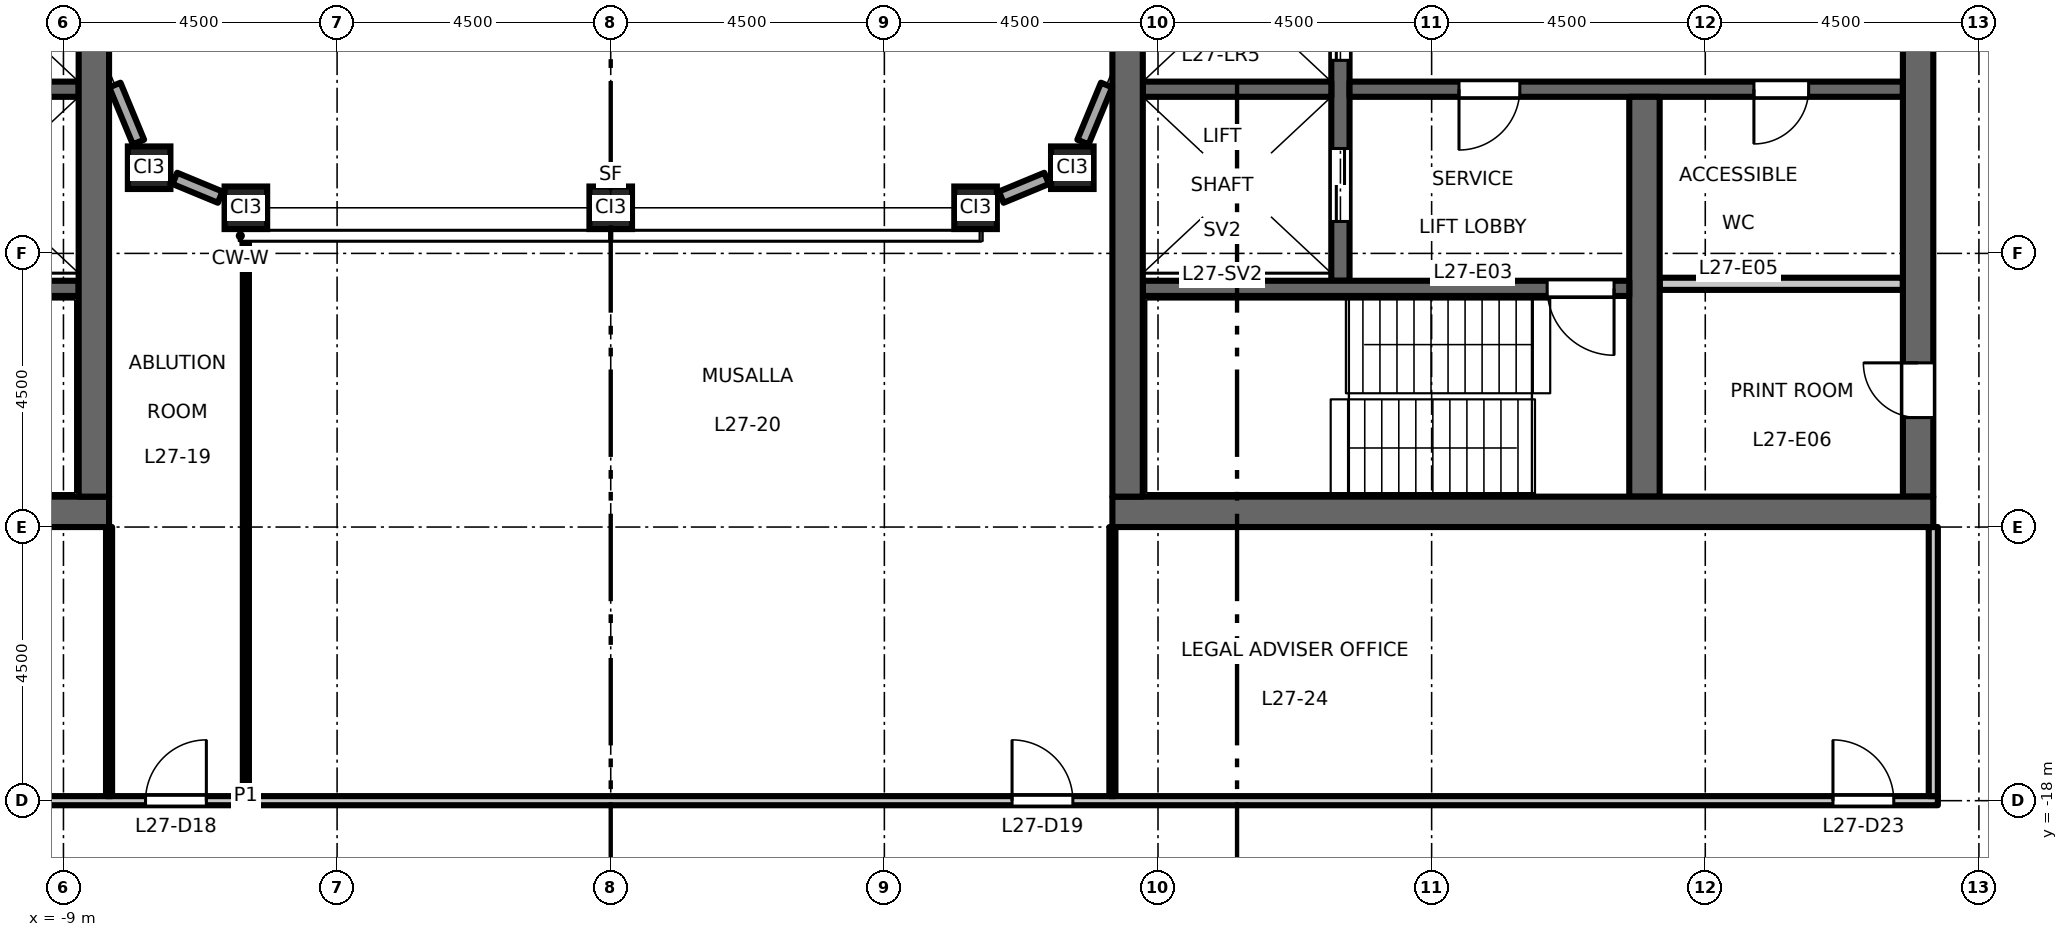
"""IFC4 building model, lengths in metres.
Left out: names, types, materials, properties, quantities, classifications, styles, units other than length and angle.
Written with IfcOpenShell. Run it as: python <this file> out.ifc"""

import sys

from ifc_helpers import new_model, si_unit, direction, frame, frame_2d, origin, origin_2d, place, context, subcontext, project, spatial, rectangle, hollow_rectangle, extrude, element, fill, save


model = new_model("IFC4")
c1 = context("Model", 3, precision=1e-05, world=origin(), true_north=direction((0.0, 1.0)))
c2 = subcontext(c1, "Body", "Model", "MODEL_VIEW")
j1 = project(units=[si_unit("LENGTHUNIT", "METRE"), si_unit("PLANEANGLEUNIT", "RADIAN")], contexts=[c1])
p1 = place(None, origin())
s1 = spatial("IfcSite", under=j1, at=p1, CompositionType="ELEMENT")
p2 = place(p1, origin())
s2 = spatial("IfcBuilding", under=s1, at=p2, CompositionType="ELEMENT")
p3 = place(p2, frame((0.0, 0.0, 127.2)))
s3 = spatial("IfcBuildingStorey", under=s2, at=p3, CompositionType="ELEMENT", Elevation=127.2)
for number, where, z_axis, x_axis in (
    (1, (-7.591, -7.591, 0.0), (0.0, 0.0, 1.0), (1.0, 0.0, 0.0)),
    (2, (-6.0, -8.25, 0.0), (0.0, 0.0, 1.0), (1.0, 0.0, 0.0)),
    (3, (0.0, -8.25, 0.0), (0.0, 0.0, 1.0), (1.0, 0.0, 0.0)),
    (4, (6.0, -8.25, 0.0), (0.0, 0.0, 1.0), (1.0, 0.0, 0.0)),
    (5, (7.591, -7.591, 0.0), (0.0, 0.0, 1.0), (1.0, 0.0, 0.0)),
):
    element("IfcColumn", number, at=place(p3, frame(where, z_axis=z_axis, x_axis=x_axis)), inside=s3, PredefinedType="COLUMN", context=c2, shape_type="SweptSolid", body=[
        extrude(hollow_rectangle(XDim=0.7, YDim=0.7, WallThickness=0.04, at=origin_2d()), origin(), (0.0, 0.0, 1.0), 4.5),
    ])
p4 = place(p3, frame((-8.75, -6.3, 0.0), z_axis=(0.0, 0.0, 1.0), x_axis=(-1.0, 0.0, 0.0)))
e6 = element("IfcWall", 6, at=p4, inside=s3, PredefinedType="SHEAR", context=c2, shape_type="SweptSolid", body=[
    extrude(rectangle(XDim=3.1, YDim=0.25, at=frame_2d((1.55, 0.0))), origin(), (0.0, 0.0, 1.0), 4.35),
])
p5 = place(p3, frame((-8.75, -9.575, 0.0), z_axis=(0.0, 0.0, 1.0), x_axis=(-1.0, 0.0, 0.0)))
e7 = element("IfcWall", 7, at=p5, inside=s3, PredefinedType="SHEAR", context=c2, shape_type="SweptSolid", body=[
    extrude(rectangle(XDim=8.0, YDim=0.25, at=frame_2d((4.0, 0.0))), origin(), (0.0, 0.0, 1.0), 4.35),
])
p6 = place(p5, frame((6.65, 0.0, 0.0)))
e8 = element("IfcOpeningElement", 8, at=p6, cuts=e7, PredefinedType="OPENING", context=c2, shape_type="SweptSolid", body=[
    extrude(rectangle(XDim=1.1, YDim=2.1, at=frame_2d((0.55, 1.05))), frame((0.0, 0.135, 0.0), z_axis=(0.0, -1.0, 0.0), x_axis=(1.0, 0.0, 0.0)), (0.0, 0.0, 1.0), 0.27),
])
p7 = place(p3, frame((-8.25, -13.25, 0.0), z_axis=(0.0, 0.0, 1.0), x_axis=(-1.0, 0.0, 0.0)))
e9 = element("IfcWall", 9, at=p7, inside=s3, PredefinedType="SHEAR", context=c2, shape_type="SweptSolid", body=[
    extrude(rectangle(XDim=13.5, YDim=0.5, at=frame_2d((6.75, 0.0))), origin(), (0.0, 0.0, 1.0), 4.35),
])
p8 = place(p3, frame((-8.5, -13.0, 0.0), z_axis=(0.0, 0.0, 1.0), x_axis=(0.0, 1.0, 0.0)))
e10 = element("IfcWall", 10, at=p8, inside=s3, PredefinedType="SHEAR", context=c2, shape_type="SweptSolid", body=[
    extrude(rectangle(XDim=26.0, YDim=0.5, at=frame_2d((13.0, 0.0))), origin(), (0.0, 0.0, 1.0), 4.35),
])
p9 = place(p3, frame((12.0, -9.45, 0.0), z_axis=(0.0, 0.0, 1.0), x_axis=(0.0, 1.0, 0.0)))
e11 = element("IfcWall", 11, at=p9, inside=s3, PredefinedType="SHEAR", context=c2, shape_type="SweptSolid", body=[
    extrude(rectangle(XDim=18.9, YDim=0.3, at=frame_2d((9.45, 0.0))), origin(), (0.0, 0.0, 1.0), 4.35),
])
p10 = place(p9, frame((3.625, 0.0, 0.0)))
e12 = element("IfcOpeningElement", 12, at=p10, cuts=e11, PredefinedType="OPENING", context=c2, shape_type="SweptSolid", body=[
    extrude(rectangle(XDim=1.1, YDim=2.1, at=frame_2d((0.55, 1.05))), frame((0.0, 0.16, 0.0), z_axis=(0.0, -1.0, 0.0), x_axis=(1.0, 0.0, 0.0)), (0.0, 0.0, 1.0), 0.32),
])
p11 = place(p9, frame((6.775, 0.0, 0.0)))
e13 = element("IfcOpeningElement", 13, at=p11, cuts=e11, PredefinedType="OPENING", context=c2, shape_type="SweptSolid", body=[
    extrude(rectangle(XDim=1.1, YDim=2.1, at=frame_2d((0.55, 1.05))), frame((0.0, 0.16, 0.0), z_axis=(0.0, -1.0, 0.0), x_axis=(1.0, 0.0, 0.0)), (0.0, 0.0, 1.0), 0.32),
])
p12 = place(p9, frame((9.925, 0.0, 0.0)))
e14 = element("IfcOpeningElement", 14, at=p12, cuts=e11, PredefinedType="OPENING", context=c2, shape_type="SweptSolid", body=[
    extrude(rectangle(XDim=1.1, YDim=2.1, at=frame_2d((0.55, 1.05))), frame((0.0, 0.16, 0.0), z_axis=(0.0, -1.0, 0.0), x_axis=(1.0, 0.0, 0.0)), (0.0, 0.0, 1.0), 0.32),
])
p13 = place(p9, frame((13.075, 0.0, 0.0)))
e15 = element("IfcOpeningElement", 15, at=p13, cuts=e11, PredefinedType="OPENING", context=c2, shape_type="SweptSolid", body=[
    extrude(rectangle(XDim=1.1, YDim=2.1, at=frame_2d((0.55, 1.05))), frame((0.0, 0.16, 0.0), z_axis=(0.0, -1.0, 0.0), x_axis=(1.0, 0.0, 0.0)), (0.0, 0.0, 1.0), 0.32),
])
p14 = place(p9, frame((16.725, 0.0, 0.0)))
e16 = element("IfcOpeningElement", 16, at=p14, cuts=e11, PredefinedType="OPENING", context=c2, shape_type="SweptSolid", body=[
    extrude(rectangle(XDim=1.2, YDim=2.1, at=frame_2d((0.6, 1.05))), frame((0.0, 0.16, 0.0), z_axis=(0.0, -1.0, 0.0), x_axis=(1.0, 0.0, 0.0)), (0.0, 0.0, 1.0), 0.32),
])
p15 = place(p9, frame((0.975, 0.0, 0.0)))
e17 = element("IfcOpeningElement", 17, at=p15, cuts=e11, PredefinedType="OPENING", context=c2, shape_type="SweptSolid", body=[
    extrude(rectangle(XDim=1.2, YDim=2.1, at=frame_2d((0.6, 1.05))), frame((0.0, 0.16, 0.0), z_axis=(0.0, -1.0, 0.0), x_axis=(1.0, 0.0, 0.0)), (0.0, 0.0, 1.0), 0.32),
])
p16 = place(p3, frame((12.15, -6.3, 0.0), z_axis=(0.0, 0.0, 1.0), x_axis=(1.0, 0.0, 0.0)))
e18 = element("IfcWall", 18, at=p16, inside=s3, PredefinedType="SHEAR", context=c2, shape_type="SweptSolid", body=[
    extrude(rectangle(XDim=9.1, YDim=0.25, at=frame_2d((4.55, 0.0))), origin(), (0.0, 0.0, 1.0), 4.35),
])
p17 = place(p16, frame((1.8, 0.0, 0.0)))
e19 = element("IfcOpeningElement", 19, at=p17, cuts=e18, PredefinedType="OPENING", context=c2, shape_type="SweptSolid", body=[
    extrude(rectangle(XDim=1.0, YDim=2.1, at=frame_2d((0.5, 1.05))), frame((0.0, 0.135, 0.0), z_axis=(0.0, -1.0, 0.0), x_axis=(1.0, 0.0, 0.0)), (0.0, 0.0, 1.0), 0.27),
])
p18 = place(p16, frame((6.65, 0.0, 0.0)))
e20 = element("IfcOpeningElement", 20, at=p18, cuts=e18, PredefinedType="OPENING", context=c2, shape_type="SweptSolid", body=[
    extrude(rectangle(XDim=0.9, YDim=2.1, at=frame_2d((0.45, 1.05))), frame((0.0, 0.135, 0.0), z_axis=(0.0, -1.0, 0.0), x_axis=(1.0, 0.0, 0.0)), (0.0, 0.0, 1.0), 0.27),
])
p19 = place(p3, frame((21.5, -13.0, 0.0), z_axis=(0.0, 0.0, 1.0), x_axis=(0.0, 1.0, 0.0)))
e21 = element("IfcWall", 21, at=p19, inside=s3, PredefinedType="SHEAR", context=c2, shape_type="SweptSolid", body=[
    extrude(rectangle(XDim=26.0, YDim=0.5, at=frame_2d((13.0, 0.0))), origin(), (0.0, 0.0, 1.0), 4.35),
])
p20 = place(p19, frame((16.825, 0.0, 0.0)))
e22 = element("IfcOpeningElement", 22, at=p20, cuts=e21, PredefinedType="OPENING", context=c2, shape_type="SweptSolid", body=[
    extrude(rectangle(XDim=1.8, YDim=2.1, at=frame_2d((0.9, 1.05))), frame((0.0, 0.26, 0.0), z_axis=(0.0, -1.0, 0.0), x_axis=(1.0, 0.0, 0.0)), (0.0, 0.0, 1.0), 0.52),
])
p21 = place(p19, frame((7.375, 0.0, 0.0)))
e23 = element("IfcOpeningElement", 23, at=p21, cuts=e21, PredefinedType="OPENING", context=c2, shape_type="SweptSolid", body=[
    extrude(rectangle(XDim=1.8, YDim=2.1, at=frame_2d((0.9, 1.05))), frame((0.0, 0.26, 0.0), z_axis=(0.0, -1.0, 0.0), x_axis=(1.0, 0.0, 0.0)), (0.0, 0.0, 1.0), 0.52),
])
p22 = place(p19, frame((1.3, 0.0, 0.0)))
e24 = element("IfcOpeningElement", 24, at=p22, cuts=e21, PredefinedType="OPENING", context=c2, shape_type="SweptSolid", body=[
    extrude(rectangle(XDim=0.9, YDim=2.1, at=frame_2d((0.45, 1.05))), frame((0.0, 0.26, 0.0), z_axis=(0.0, -1.0, 0.0), x_axis=(1.0, 0.0, 0.0)), (0.0, 0.0, 1.0), 0.52),
])
p23 = place(p3, frame((17.25, -9.5, 0.0), z_axis=(0.0, 0.0, 1.0), x_axis=(1.0, 0.0, 0.0)))
e25 = element("IfcWall", 25, at=p23, inside=s3, PredefinedType="PARTITIONING", context=c2, shape_type="SweptSolid", body=[
    extrude(rectangle(XDim=4.0, YDim=0.2, at=frame_2d((2.0, 0.0))), origin(), (0.0, 0.0, 1.0), 4.35),
])
p24 = place(p3, frame((17.0, -13.0, 0.0), z_axis=(0.0, 0.0, 1.0), x_axis=(0.0, 1.0, 0.0)))
e26 = element("IfcWall", 26, at=p24, inside=s3, PredefinedType="SHEAR", context=c2, shape_type="SweptSolid", body=[
    extrude(rectangle(XDim=6.575, YDim=0.5, at=frame_2d((3.288, 0.0))), origin(), (0.0, 0.0, 1.0), 4.35),
])
p25 = place(p3, frame((8.75, -6.3, 0.0), z_axis=(0.0, 0.0, 1.0), x_axis=(1.0, 0.0, 0.0)))
e27 = element("IfcWall", 27, at=p25, inside=s3, PredefinedType="SHEAR", context=c2, shape_type="SweptSolid", body=[
    extrude(rectangle(XDim=3.1, YDim=0.25, at=frame_2d((1.55, 0.0))), origin(), (0.0, 0.0, 1.0), 4.35),
])
p26 = place(p3, frame((8.75, -9.575, 0.0), z_axis=(0.0, 0.0, 1.0), x_axis=(1.0, 0.0, 0.0)))
e28 = element("IfcWall", 28, at=p26, inside=s3, PredefinedType="SHEAR", context=c2, shape_type="SweptSolid", body=[
    extrude(rectangle(XDim=8.0, YDim=0.25, at=frame_2d((4.0, 0.0))), origin(), (0.0, 0.0, 1.0), 4.35),
])
p27 = place(p26, frame((6.65, 0.0, 0.0)))
e29 = element("IfcOpeningElement", 29, at=p27, cuts=e28, PredefinedType="OPENING", context=c2, shape_type="SweptSolid", body=[
    extrude(rectangle(XDim=1.1, YDim=2.1, at=frame_2d((0.55, 1.05))), frame((0.0, 0.135, 0.0), z_axis=(0.0, -1.0, 0.0), x_axis=(1.0, 0.0, 0.0)), (0.0, 0.0, 1.0), 0.27),
])
p28 = place(p3, frame((8.25, -13.25, 0.0), z_axis=(0.0, 0.0, 1.0), x_axis=(1.0, 0.0, 0.0)))
e30 = element("IfcWall", 30, at=p28, inside=s3, PredefinedType="SHEAR", context=c2, shape_type="SweptSolid", body=[
    extrude(rectangle(XDim=13.5, YDim=0.5, at=frame_2d((6.75, 0.0))), origin(), (0.0, 0.0, 1.0), 4.35),
])
p29 = place(p3, frame((8.5, -13.0, 0.0), z_axis=(0.0, 0.0, 1.0), x_axis=(0.0, 1.0, 0.0)))
e31 = element("IfcWall", 31, at=p29, inside=s3, PredefinedType="SHEAR", context=c2, shape_type="SweptSolid", body=[
    extrude(rectangle(XDim=26.0, YDim=0.5, at=frame_2d((13.0, 0.0))), origin(), (0.0, 0.0, 1.0), 4.35),
])
p30 = place(p3, frame((6.423, -8.075, 0.0), z_axis=(0.0, 0.0, 1.0), x_axis=(0.923817771127, 0.382832503518, 0.0)))
e32 = element("IfcWall", 32, at=p30, inside=s3, PredefinedType="STANDARD", context=c2, shape_type="SweptSolid", body=[
    extrude(rectangle(XDim=0.807, YDim=0.2, at=frame_2d((0.404, 0.0))), origin(), (0.0, 0.0, 1.0), 3.826),
])
for number, where, z_axis, x_axis in (
    (33, (7.766, -7.168, 0.0), (0.0, 0.0, 1.0), (0.383, 0.924, 0.0)),
    (34, (-8.154, -6.231, 0.0), (0.0, 0.0, 1.0), (0.383, -0.924, 0.0)),
):
    element("IfcWall", number, at=place(p3, frame(where, z_axis=z_axis, x_axis=x_axis)), inside=s3, PredefinedType="STANDARD", context=c2, shape_type="SweptSolid", body=[
        extrude(rectangle(XDim=1.015, YDim=0.2, at=frame_2d((0.507, 0.0))), origin(), (0.0, 0.0, 1.0), 3.826),
    ])
p31 = place(p3, frame((-7.168, -7.766, 0.0), z_axis=(0.0, 0.0, 1.0), x_axis=(0.923817771127, -0.382832503518, 0.0)))
e35 = element("IfcWall", 35, at=p31, inside=s3, PredefinedType="STANDARD", context=c2, shape_type="SweptSolid", body=[
    extrude(rectangle(XDim=0.807, YDim=0.2, at=frame_2d((0.404, 0.0))), origin(), (0.0, 0.0, 1.0), 3.826),
])
p32 = place(p3, frame((-21.825, -18.0, 0.0), z_axis=(0.0, 0.0, 1.0), x_axis=(1.0, 0.0, 0.0)))
e36 = element("IfcWall", 36, at=p32, inside=s3, PredefinedType="PARTITIONING", context=c2, shape_type="SweptSolid", body=[
    extrude(rectangle(XDim=43.65, YDim=0.15, at=frame_2d((21.825, 0.0))), origin(), (0.0, 0.0, 1.0), 4.35),
])
p33 = place(p32, frame((14.175, 0.0, 0.0)))
e37 = element("IfcOpeningElement", 37, at=p33, cuts=e36, PredefinedType="OPENING", context=c2, shape_type="SweptSolid", body=[
    extrude(rectangle(XDim=1.0, YDim=2.1, at=frame_2d((0.5, 1.05))), frame((0.0, 0.085, 0.0), z_axis=(0.0, -1.0, 0.0), x_axis=(1.0, 0.0, 0.0)), (0.0, 0.0, 1.0), 0.17),
])
p34 = place(p32, frame((28.425, 0.0, 0.0)))
e38 = element("IfcOpeningElement", 38, at=p34, cuts=e36, PredefinedType="OPENING", context=c2, shape_type="SweptSolid", body=[
    extrude(rectangle(XDim=1.0, YDim=2.1, at=frame_2d((0.5, 1.05))), frame((0.0, 0.085, 0.0), z_axis=(0.0, -1.0, 0.0), x_axis=(1.0, 0.0, 0.0)), (0.0, 0.0, 1.0), 0.17),
])
p35 = place(p32, frame((0.675, 0.0, 0.0)))
e39 = element("IfcOpeningElement", 39, at=p35, cuts=e36, PredefinedType="OPENING", context=c2, shape_type="SweptSolid", body=[
    extrude(rectangle(XDim=1.0, YDim=2.1, at=frame_2d((0.5, 1.05))), frame((0.0, 0.085, 0.0), z_axis=(0.0, -1.0, 0.0), x_axis=(1.0, 0.0, 0.0)), (0.0, 0.0, 1.0), 0.17),
])
p36 = place(p32, frame((41.925, 0.0, 0.0)))
e40 = element("IfcOpeningElement", 40, at=p36, cuts=e36, PredefinedType="OPENING", context=c2, shape_type="SweptSolid", body=[
    extrude(rectangle(XDim=1.0, YDim=2.1, at=frame_2d((0.5, 1.05))), frame((0.0, 0.085, 0.0), z_axis=(0.0, -1.0, 0.0), x_axis=(1.0, 0.0, 0.0)), (0.0, 0.0, 1.0), 0.17),
])
p37 = place(p3, frame((-8.25, -17.925, 0.0), z_axis=(0.0, 0.0, 1.0), x_axis=(0.0, 1.0, 0.0)))
e41 = element("IfcWall", 41, at=p37, inside=s3, PredefinedType="PARTITIONING", context=c2, shape_type="SweptSolid", body=[
    extrude(rectangle(XDim=4.425, YDim=0.1, at=frame_2d((2.212, 0.0))), origin(), (0.0, 0.0, 1.0), 4.35),
])
p38 = place(p3, frame((-6.0, -17.925, 0.0), z_axis=(0.0, 0.0, 1.0), x_axis=(0.0, 1.0, 0.0)))
e42 = element("IfcWall", 42, at=p38, inside=s3, PredefinedType="PARTITIONING", context=c2, shape_type="SweptSolid", body=[
    extrude(rectangle(XDim=9.275, YDim=0.1, at=frame_2d((4.638, 0.0))), origin(), (0.0, 0.0, 1.0), 4.35),
])
p39 = place(p3, frame((8.25, -17.925, 0.0), z_axis=(0.0, 0.0, 1.0), x_axis=(0.0, 1.0, 0.0)))
e43 = element("IfcWall", 43, at=p39, inside=s3, PredefinedType="PARTITIONING", context=c2, shape_type="SweptSolid", body=[
    extrude(rectangle(XDim=4.425, YDim=0.1, at=frame_2d((2.212, 0.0))), origin(), (0.0, 0.0, 1.0), 4.35),
])
p40 = place(p3, frame((21.75, -17.925, 0.0), z_axis=(0.0, 0.0, 1.0), x_axis=(0.0, 1.0, 0.0)))
e44 = element("IfcWall", 44, at=p40, inside=s3, PredefinedType="PARTITIONING", context=c2, shape_type="SweptSolid", body=[
    extrude(rectangle(XDim=4.425, YDim=0.15, at=frame_2d((2.212, 0.0))), origin(), (0.0, 0.0, 1.0), 4.35),
])
p41 = place(p17, origin())
e45 = element("IfcDoor", 45, at=p41, inside=s3, OperationType="SINGLE_SWING_LEFT", PredefinedType="DOOR", context=c2, shape_type="SweptSolid", body=[
    extrude(rectangle(XDim=1.0, YDim=2.1, at=frame_2d((0.5, 1.05))), frame((0.0, 0.025, 0.0), z_axis=(0.0, -1.0, 0.0), x_axis=(1.0, 0.0, 0.0)), (0.0, 0.0, 1.0), 0.05),
])
fill(e19, e45)
p42 = place(p27, origin())
e46 = element("IfcDoor", 46, at=p42, inside=s3, OperationType="SINGLE_SWING_RIGHT", PredefinedType="DOOR", context=c2, shape_type="SweptSolid", body=[
    extrude(rectangle(XDim=1.1, YDim=2.1, at=frame_2d((0.55, 1.05))), frame((0.0, 0.025, 0.0), z_axis=(0.0, -1.0, 0.0), x_axis=(1.0, 0.0, 0.0)), (0.0, 0.0, 1.0), 0.05),
])
fill(e29, e46)
p43 = place(p10, origin())
e47 = element("IfcDoor", 47, at=p43, inside=s3, OperationType="DOUBLE_DOOR_SLIDING", PredefinedType="DOOR", context=c2, shape_type="SweptSolid", body=[
    extrude(rectangle(XDim=1.1, YDim=2.1, at=frame_2d((0.55, 1.05))), frame((0.0, 0.025, 0.0), z_axis=(0.0, -1.0, 0.0), x_axis=(1.0, 0.0, 0.0)), (0.0, 0.0, 1.0), 0.05),
])
fill(e12, e47)
p44 = place(p15, origin())
e48 = element("IfcDoor", 48, at=p44, inside=s3, OperationType="DOUBLE_DOOR_SLIDING", PredefinedType="DOOR", context=c2, shape_type="SweptSolid", body=[
    extrude(rectangle(XDim=1.2, YDim=2.1, at=frame_2d((0.6, 1.05))), frame((0.0, 0.025, 0.0), z_axis=(0.0, -1.0, 0.0), x_axis=(1.0, 0.0, 0.0)), (0.0, 0.0, 1.0), 0.05),
])
fill(e17, e48)
p45 = place(p18, origin())
e49 = element("IfcDoor", 49, at=p45, inside=s3, OperationType="SINGLE_SWING_LEFT", PredefinedType="DOOR", context=c2, shape_type="SweptSolid", body=[
    extrude(rectangle(XDim=0.9, YDim=2.1, at=frame_2d((0.45, 1.05))), frame((0.0, 0.025, 0.0), z_axis=(0.0, -1.0, 0.0), x_axis=(1.0, 0.0, 0.0)), (0.0, 0.0, 1.0), 0.05),
])
fill(e20, e49)
p46 = place(p22, origin())
e50 = element("IfcDoor", 50, at=p46, inside=s3, OperationType="SINGLE_SWING_LEFT", PredefinedType="DOOR", context=c2, shape_type="SweptSolid", body=[
    extrude(rectangle(XDim=0.9, YDim=2.1, at=frame_2d((0.45, 1.05))), frame((0.0, 0.025, 0.0), z_axis=(0.0, -1.0, 0.0), x_axis=(1.0, 0.0, 0.0)), (0.0, 0.0, 1.0), 0.05),
])
fill(e24, e50)
p47 = place(p33, origin())
e51 = element("IfcDoor", 51, at=p47, inside=s3, OperationType="SINGLE_SWING_RIGHT", PredefinedType="DOOR", context=c2, shape_type="SweptSolid", body=[
    extrude(rectangle(XDim=1.0, YDim=2.1, at=frame_2d((0.5, 1.05))), frame((0.0, 0.025, 0.0), z_axis=(0.0, -1.0, 0.0), x_axis=(1.0, 0.0, 0.0)), (0.0, 0.0, 1.0), 0.05),
])
fill(e37, e51)
p48 = place(p34, origin())
e52 = element("IfcDoor", 52, at=p48, inside=s3, OperationType="SINGLE_SWING_LEFT", PredefinedType="DOOR", context=c2, shape_type="SweptSolid", body=[
    extrude(rectangle(XDim=1.0, YDim=2.1, at=frame_2d((0.5, 1.05))), frame((0.0, 0.025, 0.0), z_axis=(0.0, -1.0, 0.0), x_axis=(1.0, 0.0, 0.0)), (0.0, 0.0, 1.0), 0.05),
])
fill(e38, e52)
p49 = place(p36, origin())
e53 = element("IfcDoor", 53, at=p49, inside=s3, OperationType="SINGLE_SWING_LEFT", PredefinedType="DOOR", context=c2, shape_type="SweptSolid", body=[
    extrude(rectangle(XDim=1.0, YDim=2.1, at=frame_2d((0.5, 1.05))), frame((0.0, 0.025, 0.0), z_axis=(0.0, -1.0, 0.0), x_axis=(1.0, 0.0, 0.0)), (0.0, 0.0, 1.0), 0.05),
])
fill(e40, e53)
save(model, sys.argv[1])
